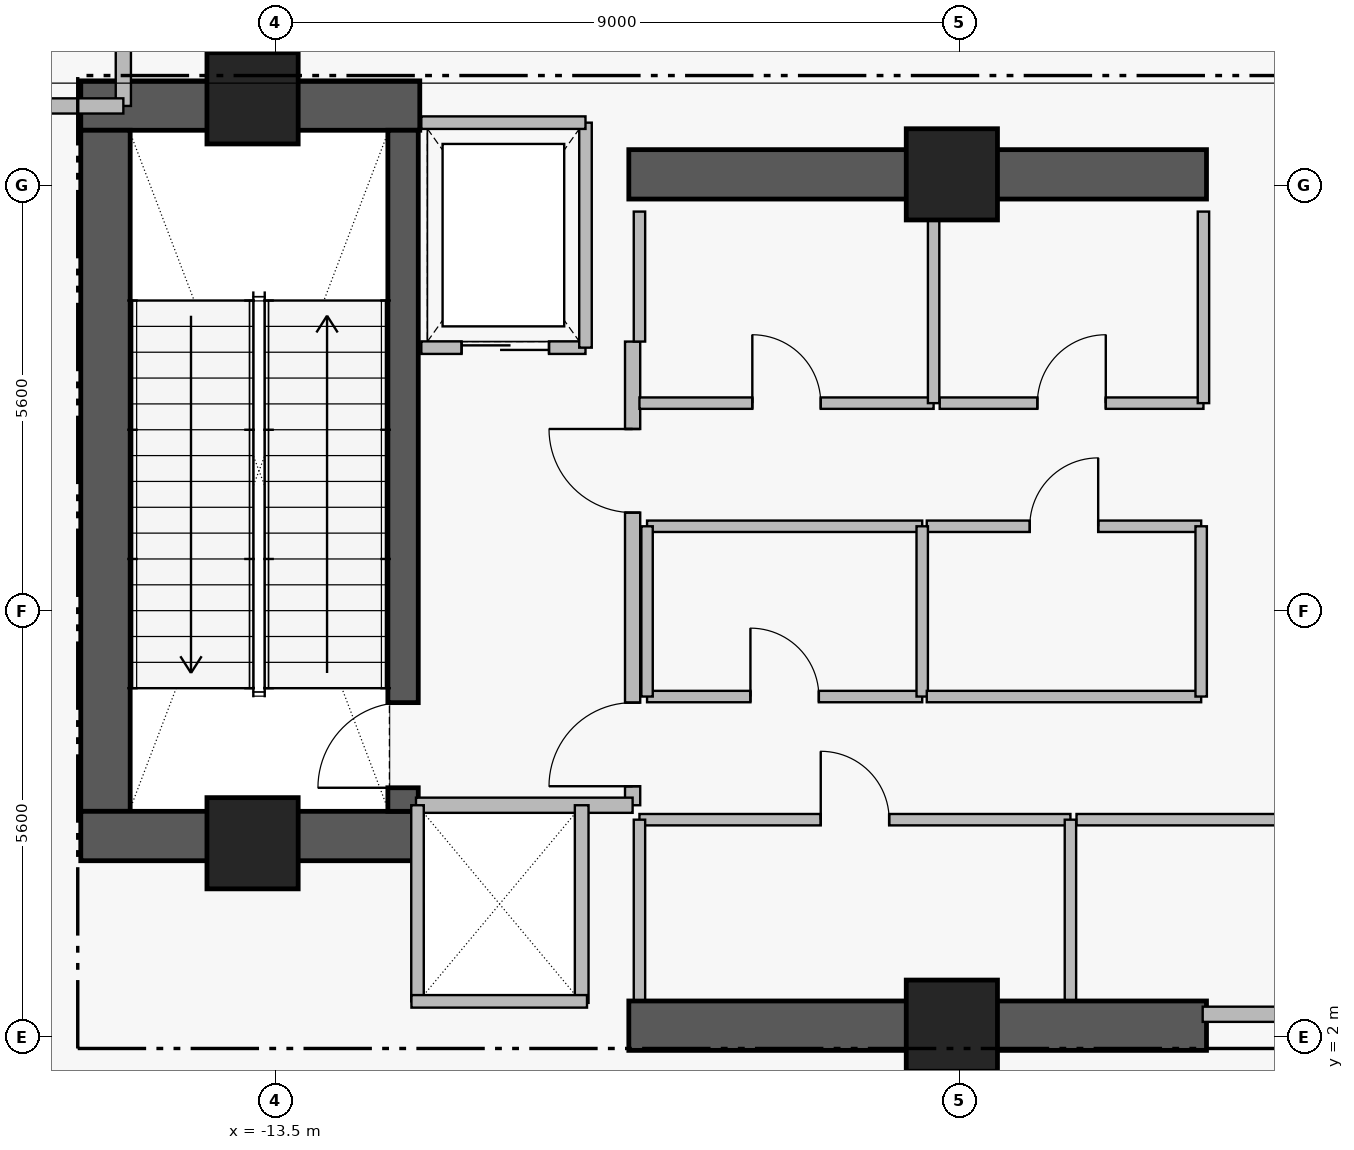
"""IFC4 building model, lengths in metres.
Left out: names, types, materials, properties, quantities, classifications, styles, units other than length and angle.
Written with IfcOpenShell. Run it as: python <this file> out.ifc"""

import sys

from ifc_helpers import new_model, si_unit, direction, frame, frame_2d, origin, origin_2d, place, context, subcontext, project, spatial, rectangle, extrude, element, fill, save


model = new_model("IFC4")
c1 = context("Model", 3, precision=1e-05, world=origin(), true_north=direction((0.0, 1.0)))
c2 = subcontext(c1, "Body", "Model", "MODEL_VIEW")
j1 = project(units=[si_unit("LENGTHUNIT", "METRE"), si_unit("PLANEANGLEUNIT", "RADIAN")], contexts=[c1])
p1 = place(None, origin())
s1 = spatial("IfcSite", under=j1, at=p1, CompositionType="ELEMENT")
p2 = place(p1, origin())
s2 = spatial("IfcBuilding", under=s1, at=p2, CompositionType="ELEMENT")
p3 = place(p2, frame((0.0, 0.0, 233.65)))
s3 = spatial("IfcBuildingStorey", under=s2, at=p3, CompositionType="ELEMENT", Elevation=233.65)
p4 = place(p3, frame((-16.06, 14.255, 0.0), z_axis=(0.0, 0.0, 1.0), x_axis=(1.0, 0.0, 0.0)))
e1 = element("IfcWall", 1, at=p4, inside=s3, PredefinedType="SHEAR", context=c2, shape_type="SweptSolid", body=[
    extrude(rectangle(XDim=4.46, YDim=0.65, at=frame_2d((2.23, 0.0))), origin(), (0.0, 0.0, 1.0), 5.81),
])
p5 = place(p3, frame((-15.735, 4.97, 0.0), z_axis=(0.0, 0.0, 1.0), x_axis=(0.0, 1.0, 0.0)))
e2 = element("IfcWall", 2, at=p5, inside=s3, PredefinedType="SHEAR", context=c2, shape_type="SweptSolid", body=[
    extrude(rectangle(XDim=8.96, YDim=0.65, at=frame_2d((4.48, 0.0))), origin(), (0.0, 0.0, 1.0), 5.81),
])
p6 = place(p3, frame((-16.06, 4.645, 0.0), z_axis=(0.0, 0.0, 1.0), x_axis=(1.0, 0.0, 0.0)))
e3 = element("IfcWall", 3, at=p6, inside=s3, PredefinedType="SHEAR", context=c2, shape_type="SweptSolid", body=[
    extrude(rectangle(XDim=4.46, YDim=0.65, at=frame_2d((2.23, 0.0))), origin(), (0.0, 0.0, 1.0), 5.81),
])
for number, where, z_axis, x_axis in (
    (4, (-8.85, 2.15, 0.0), (0.0, 0.0, 1.0), (1.0, 0.0, 0.0)),
    (5, (-8.85, 13.35, 0.0), (0.0, 0.0, 1.0), (1.0, 0.0, 0.0)),
):
    element("IfcWall", number, at=place(p3, frame(where, z_axis=z_axis, x_axis=x_axis)), inside=s3, PredefinedType="SHEAR", context=c2, shape_type="SweptSolid", body=[
        extrude(rectangle(XDim=7.6, YDim=0.65, at=frame_2d((3.8, 0.0))), origin(), (0.0, 0.0, 1.0), 5.74),
    ])
p7 = place(p3, frame((-11.82, 4.97, 0.0), z_axis=(0.0, 0.0, 1.0), x_axis=(0.0, 1.0, 0.0)))
e6 = element("IfcWall", 6, at=p7, inside=s3, PredefinedType="SHEAR", context=c2, shape_type="SweptSolid", body=[
    extrude(rectangle(XDim=8.96, YDim=0.4, at=frame_2d((4.48, 0.0))), origin(), (0.0, 0.0, 1.0), 5.81),
])
p8 = place(p7, frame((0.31, 0.0, 0.0)))
e7 = element("IfcOpeningElement", 7, at=p8, cuts=e6, PredefinedType="OPENING", context=c2, shape_type="SweptSolid", body=[
    extrude(rectangle(XDim=1.12, YDim=2.22, at=frame_2d((0.56, 1.11))), frame((0.0, 0.21, 0.0), z_axis=(0.0, -1.0, 0.0), x_axis=(1.0, 0.0, 0.0)), (0.0, 0.0, 1.0), 0.42),
])
for number, where, z_axis, x_axis in (
    (8, (-13.8, 14.35, 0.0), (0.0, 0.0, 1.0), (1.0, 0.0, 0.0)),
    (9, (-4.6, 13.35, 0.0), (0.0, 0.0, 1.0), (1.0, 0.0, 0.0)),
    (10, (-13.8, 4.55, 0.0), (0.0, 0.0, 1.0), (1.0, 0.0, 0.0)),
    (11, (-4.6, 2.15, 0.0), (0.0, 0.0, 1.0), (1.0, 0.0, 0.0)),
):
    element("IfcColumn", number, at=place(p3, frame(where, z_axis=z_axis, x_axis=x_axis)), inside=s3, PredefinedType="COLUMN", context=c2, shape_type="SweptSolid", body=[
        extrude(rectangle(XDim=1.2, YDim=1.2, at=origin_2d()), origin(), (0.0, 0.0, 1.0), 6.0),
    ])
p9 = place(p3, frame((-8.8, 5.05, 0.0), z_axis=(0.0, 0.0, 1.0), x_axis=(0.0, 1.0, 0.0)))
e12 = element("IfcWall", 12, at=p9, inside=s3, PredefinedType="PARTITIONING", context=c2, shape_type="SweptSolid", body=[
    extrude(rectangle(XDim=6.1, YDim=0.2, at=frame_2d((3.05, 0.0))), origin(), (0.0, 0.0, 1.0), 5.74),
])
p10 = place(p9, frame((0.25, 0.0, 0.0)))
e13 = element("IfcOpeningElement", 13, at=p10, cuts=e12, PredefinedType="OPENING", context=c2, shape_type="SweptSolid", body=[
    extrude(rectangle(XDim=1.1, YDim=2.2, at=frame_2d((0.55, 1.1))), frame((0.0, 0.11, 0.0), z_axis=(0.0, -1.0, 0.0), x_axis=(1.0, 0.0, 0.0)), (0.0, 0.0, 1.0), 0.22),
])
p11 = place(p9, frame((3.85, 0.0, 0.0)))
e14 = element("IfcOpeningElement", 14, at=p11, cuts=e12, PredefinedType="OPENING", context=c2, shape_type="SweptSolid", body=[
    extrude(rectangle(XDim=1.1, YDim=2.2, at=frame_2d((0.55, 1.1))), frame((0.0, 0.11, 0.0), z_axis=(0.0, -1.0, 0.0), x_axis=(1.0, 0.0, 0.0)), (0.0, 0.0, 1.0), 0.22),
])
p12 = place(p3, frame((-11.58, 11.07, 0.0), z_axis=(0.0, 0.0, 1.0), x_axis=(1.0, 0.0, 0.0)))
e15 = element("IfcWall", 15, at=p12, inside=s3, PredefinedType="PARTITIONING", context=c2, shape_type="SweptSolid", body=[
    extrude(rectangle(XDim=2.16, YDim=0.165, at=frame_2d((1.08, 0.0))), origin(), (0.0, 0.0, 1.0), 5.74),
])
p13 = place(p12, frame((0.53, 0.0, 0.0)))
e16 = element("IfcOpeningElement", 16, at=p13, cuts=e15, PredefinedType="OPENING", context=c2, shape_type="SweptSolid", body=[
    extrude(rectangle(XDim=1.15, YDim=2.25, at=frame_2d((0.575, 1.125))), frame((0.0, 0.093, 0.0), z_axis=(0.0, -1.0, 0.0), x_axis=(1.0, 0.0, 0.0)), (0.0, 0.0, 1.0), 0.185),
])
p14 = place(p3, frame((-8.71, 4.86, 0.0), z_axis=(0.0, 0.0, 1.0), x_axis=(1.0, 0.0, 0.0)))
e17 = element("IfcWall", 17, at=p14, inside=s3, PredefinedType="PARTITIONING", context=c2, shape_type="SweptSolid", body=[
    extrude(rectangle(XDim=5.67, YDim=0.15, at=frame_2d((2.835, 0.0))), origin(), (0.0, 0.0, 1.0), 5.74),
])
p15 = place(p14, frame((2.385, 0.0, 0.0)))
e18 = element("IfcOpeningElement", 18, at=p15, cuts=e17, PredefinedType="OPENING", context=c2, shape_type="SweptSolid", body=[
    extrude(rectangle(XDim=0.9, YDim=2.15, at=frame_2d((0.45, 1.075))), frame((0.0, 0.085, 0.0), z_axis=(0.0, -1.0, 0.0), x_axis=(1.0, 0.0, 0.0)), (0.0, 0.0, 1.0), 0.17),
])
p16 = place(p3, frame((-2.96, 4.86, 0.0), z_axis=(0.0, 0.0, 1.0), x_axis=(1.0, 0.0, 0.0)))
e19 = element("IfcWall", 19, at=p16, inside=s3, PredefinedType="PARTITIONING", context=c2, shape_type="SweptSolid", body=[
    extrude(rectangle(XDim=6.67, YDim=0.15, at=frame_2d((3.335, 0.0))), origin(), (0.0, 0.0, 1.0), 5.74),
])
p17 = place(p16, frame((2.885, 0.0, 0.0)))
e20 = element("IfcOpeningElement", 20, at=p17, cuts=e19, PredefinedType="OPENING", context=c2, shape_type="SweptSolid", body=[
    extrude(rectangle(XDim=0.9, YDim=2.15, at=frame_2d((0.45, 1.075))), frame((0.0, 0.085, 0.0), z_axis=(0.0, -1.0, 0.0), x_axis=(1.0, 0.0, 0.0)), (0.0, 0.0, 1.0), 0.17),
])
p18 = place(p3, frame((-8.71, 10.34, 0.0), z_axis=(0.0, 0.0, 1.0), x_axis=(1.0, 0.0, 0.0)))
e21 = element("IfcWall", 21, at=p18, inside=s3, PredefinedType="PARTITIONING", context=c2, shape_type="SweptSolid", body=[
    extrude(rectangle(XDim=3.87, YDim=0.15, at=frame_2d((1.935, 0.0))), origin(), (0.0, 0.0, 1.0), 5.74),
])
p19 = place(p18, frame((1.485, 0.0, 0.0)))
e22 = element("IfcOpeningElement", 22, at=p19, cuts=e21, PredefinedType="OPENING", context=c2, shape_type="SweptSolid", body=[
    extrude(rectangle(XDim=0.9, YDim=2.15, at=frame_2d((0.45, 1.075))), frame((0.0, 0.085, 0.0), z_axis=(0.0, -1.0, 0.0), x_axis=(1.0, 0.0, 0.0)), (0.0, 0.0, 1.0), 0.17),
])
p20 = place(p3, frame((-4.76, 10.34, 0.0), z_axis=(0.0, 0.0, 1.0), x_axis=(1.0, 0.0, 0.0)))
e23 = element("IfcWall", 23, at=p20, inside=s3, PredefinedType="PARTITIONING", context=c2, shape_type="SweptSolid", body=[
    extrude(rectangle(XDim=3.47, YDim=0.15, at=frame_2d((1.735, 0.0))), origin(), (0.0, 0.0, 1.0), 5.74),
])
p21 = place(p20, frame((1.285, 0.0, 0.0)))
e24 = element("IfcOpeningElement", 24, at=p21, cuts=e23, PredefinedType="OPENING", context=c2, shape_type="SweptSolid", body=[
    extrude(rectangle(XDim=0.9, YDim=2.15, at=frame_2d((0.45, 1.075))), frame((0.0, 0.085, 0.0), z_axis=(0.0, -1.0, 0.0), x_axis=(1.0, 0.0, 0.0)), (0.0, 0.0, 1.0), 0.17),
])
p22 = place(p3, frame((-8.61, 6.48, 0.0), z_axis=(0.0, 0.0, 1.0), x_axis=(1.0, 0.0, 0.0)))
e25 = element("IfcWall", 25, at=p22, inside=s3, PredefinedType="PARTITIONING", context=c2, shape_type="SweptSolid", body=[
    extrude(rectangle(XDim=3.62, YDim=0.15, at=frame_2d((1.81, 0.0))), origin(), (0.0, 0.0, 1.0), 5.74),
])
p23 = place(p22, frame((1.36, 0.0, 0.0)))
e26 = element("IfcOpeningElement", 26, at=p23, cuts=e25, PredefinedType="OPENING", context=c2, shape_type="SweptSolid", body=[
    extrude(rectangle(XDim=0.9, YDim=2.15, at=frame_2d((0.45, 1.075))), frame((0.0, 0.085, 0.0), z_axis=(0.0, -1.0, 0.0), x_axis=(1.0, 0.0, 0.0)), (0.0, 0.0, 1.0), 0.17),
])
p24 = place(p3, frame((-4.93, 8.72, 0.0), z_axis=(0.0, 0.0, 1.0), x_axis=(1.0, 0.0, 0.0)))
e27 = element("IfcWall", 27, at=p24, inside=s3, PredefinedType="PARTITIONING", context=c2, shape_type="SweptSolid", body=[
    extrude(rectangle(XDim=3.61, YDim=0.15, at=frame_2d((1.805, 0.0))), origin(), (0.0, 0.0, 1.0), 5.74),
])
p25 = place(p24, frame((1.355, 0.0, 0.0)))
e28 = element("IfcOpeningElement", 28, at=p25, cuts=e27, PredefinedType="OPENING", context=c2, shape_type="SweptSolid", body=[
    extrude(rectangle(XDim=0.9, YDim=2.15, at=frame_2d((0.45, 1.075))), frame((0.0, 0.085, 0.0), z_axis=(0.0, -1.0, 0.0), x_axis=(1.0, 0.0, 0.0)), (0.0, 0.0, 1.0), 0.17),
])
p26 = place(p3, frame((-15.5, 14.25, 0.0), z_axis=(0.0, 0.0, 1.0), x_axis=(0.0, 1.0, 0.0)))
e29 = element("IfcWall", 29, at=p26, inside=s3, PredefinedType="PARTITIONING", context=c2, shape_type="SweptSolid", body=[
    extrude(rectangle(XDim=5.05, YDim=0.2, at=frame_2d((2.525, 0.0))), origin(), (0.0, 0.0, 1.0), 5.74),
])
p27 = place(p26, frame((1.25, 0.0, 0.0)))
e30 = element("IfcOpeningElement", 30, at=p27, cuts=e29, PredefinedType="OPENING", context=c2, shape_type="SweptSolid", body=[
    extrude(rectangle(XDim=1.1, YDim=2.2, at=frame_2d((0.55, 1.1))), frame((0.0, 0.11, 0.0), z_axis=(0.0, -1.0, 0.0), x_axis=(1.0, 0.0, 0.0)), (0.0, 0.0, 1.0), 0.22),
])
p28 = place(p3, frame((-11.65, 5.05, 0.0), z_axis=(0.0, 0.0, 1.0), x_axis=(1.0, 0.0, 0.0)))
e31 = element("IfcWall", 31, at=p28, inside=s3, PredefinedType="PARTITIONING", context=c2, shape_type="SweptSolid", body=[
    extrude(rectangle(XDim=2.85, YDim=0.2, at=frame_2d((1.425, 0.0))), origin(), (0.0, 0.0, 1.0), 5.74),
])
p29 = place(p3, frame((-9.42, 11.07, 0.0), z_axis=(0.0, 0.0, 1.0), x_axis=(0.0, 1.0, 0.0)))
e32 = element("IfcWall", 32, at=p29, inside=s3, PredefinedType="PARTITIONING", context=c2, shape_type="SweptSolid", body=[
    extrude(rectangle(XDim=2.96, YDim=0.165, at=frame_2d((1.48, 0.0))), origin(), (0.0, 0.0, 1.0), 5.74),
])
p30 = place(p3, frame((-11.58, 14.03, 0.0), z_axis=(0.0, 0.0, 1.0), x_axis=(1.0, 0.0, 0.0)))
e33 = element("IfcWall", 33, at=p30, inside=s3, PredefinedType="PARTITIONING", context=c2, shape_type="SweptSolid", body=[
    extrude(rectangle(XDim=2.16, YDim=0.165, at=frame_2d((1.08, 0.0))), origin(), (0.0, 0.0, 1.0), 5.74),
])
p31 = place(p3, frame((-1.3, 2.3, 0.0), z_axis=(0.0, 0.0, 1.0), x_axis=(1.0, 0.0, 0.0)))
e34 = element("IfcWall", 34, at=p31, inside=s3, PredefinedType="PARTITIONING", context=c2, shape_type="SweptSolid", body=[
    extrude(rectangle(XDim=2.6, YDim=0.2, at=frame_2d((1.3, 0.0))), origin(), (0.0, 0.0, 1.0), 4.64),
])
for number, where, z_axis, x_axis in (
    (35, (-8.71, 2.49, 0.0), (0.0, 0.0, 1.0), (0.0, 1.0, 0.0)),
    (36, (-3.04, 2.49, 0.0), (0.0, 0.0, 1.0), (0.0, 1.0, 0.0)),
):
    element("IfcWall", number, at=place(p3, frame(where, z_axis=z_axis, x_axis=x_axis)), inside=s3, PredefinedType="PARTITIONING", context=c2, shape_type="SweptSolid", body=[
        extrude(rectangle(XDim=2.37, YDim=0.15, at=frame_2d((1.185, 0.0))), origin(), (0.0, 0.0, 1.0), 5.74),
    ])
p32 = place(p3, frame((-8.71, 11.15, 0.0), z_axis=(0.0, 0.0, 1.0), x_axis=(0.0, 1.0, 0.0)))
e37 = element("IfcWall", 37, at=p32, inside=s3, PredefinedType="PARTITIONING", context=c2, shape_type="SweptSolid", body=[
    extrude(rectangle(XDim=1.71, YDim=0.15, at=frame_2d((0.855, 0.0))), origin(), (0.0, 0.0, 1.0), 5.74),
])
for number, where, z_axis, x_axis in (
    (38, (-4.84, 10.34, 0.0), (0.0, 0.0, 1.0), (0.0, 1.0, 0.0)),
    (39, (-1.29, 10.34, 0.0), (0.0, 0.0, 1.0), (0.0, 1.0, 0.0)),
):
    element("IfcWall", number, at=place(p3, frame(where, z_axis=z_axis, x_axis=x_axis)), inside=s3, PredefinedType="PARTITIONING", context=c2, shape_type="SweptSolid", body=[
        extrude(rectangle(XDim=2.52, YDim=0.15, at=frame_2d((1.26, 0.0))), origin(), (0.0, 0.0, 1.0), 5.74),
    ])
p33 = place(p3, frame((-9.47, 2.45, 0.0), z_axis=(0.0, 0.0, 1.0), x_axis=(0.0, 1.0, 0.0)))
e40 = element("IfcWall", 40, at=p33, inside=s3, PredefinedType="PARTITIONING", context=c2, shape_type="SweptSolid", body=[
    extrude(rectangle(XDim=2.6, YDim=0.18, at=frame_2d((1.3, 0.0))), origin(), (0.0, 0.0, 1.0), 5.74),
])
p34 = place(p3, frame((-11.63, 2.47, 0.0), z_axis=(0.0, 0.0, 1.0), x_axis=(0.0, 1.0, 0.0)))
e41 = element("IfcWall", 41, at=p34, inside=s3, PredefinedType="PARTITIONING", context=c2, shape_type="SweptSolid", body=[
    extrude(rectangle(XDim=2.58, YDim=0.165, at=frame_2d((1.29, 0.0))), origin(), (0.0, 0.0, 1.0), 5.74),
])
p35 = place(p3, frame((-11.71, 2.47, 0.0), z_axis=(0.0, 0.0, 1.0), x_axis=(1.0, 0.0, 0.0)))
e42 = element("IfcWall", 42, at=p35, inside=s3, PredefinedType="PARTITIONING", context=c2, shape_type="SweptSolid", body=[
    extrude(rectangle(XDim=2.31, YDim=0.165, at=frame_2d((1.155, 0.0))), origin(), (0.0, 0.0, 1.0), 4.64),
])
p36 = place(p3, frame((-8.61, 8.72, 0.0), z_axis=(0.0, 0.0, 1.0), x_axis=(1.0, 0.0, 0.0)))
e43 = element("IfcWall", 43, at=p36, inside=s3, PredefinedType="PARTITIONING", context=c2, shape_type="SweptSolid", body=[
    extrude(rectangle(XDim=3.62, YDim=0.15, at=frame_2d((1.81, 0.0))), origin(), (0.0, 0.0, 1.0), 5.74),
])
for number, where, z_axis, x_axis in (
    (44, (-8.61, 6.48, 0.0), (0.0, 0.0, 1.0), (0.0, 1.0, 0.0)),
    (45, (-4.99, 6.48, 0.0), (0.0, 0.0, 1.0), (0.0, 1.0, 0.0)),
):
    element("IfcWall", number, at=place(p3, frame(where, z_axis=z_axis, x_axis=x_axis)), inside=s3, PredefinedType="PARTITIONING", context=c2, shape_type="SweptSolid", body=[
        extrude(rectangle(XDim=2.24, YDim=0.15, at=frame_2d((1.12, 0.0))), origin(), (0.0, 0.0, 1.0), 5.74),
    ])
p37 = place(p3, frame((-4.93, 6.48, 0.0), z_axis=(0.0, 0.0, 1.0), x_axis=(1.0, 0.0, 0.0)))
e46 = element("IfcWall", 46, at=p37, inside=s3, PredefinedType="PARTITIONING", context=c2, shape_type="SweptSolid", body=[
    extrude(rectangle(XDim=3.61, YDim=0.15, at=frame_2d((1.805, 0.0))), origin(), (0.0, 0.0, 1.0), 5.74),
])
p38 = place(p3, frame((-1.32, 6.48, 0.0), z_axis=(0.0, 0.0, 1.0), x_axis=(0.0, 1.0, 0.0)))
e47 = element("IfcWall", 47, at=p38, inside=s3, PredefinedType="PARTITIONING", context=c2, shape_type="SweptSolid", body=[
    extrude(rectangle(XDim=2.24, YDim=0.15, at=frame_2d((1.12, 0.0))), origin(), (0.0, 0.0, 1.0), 5.74),
])
p39 = place(p3, frame((-20.5, 14.25, 0.0), z_axis=(0.0, 0.0, 1.0), x_axis=(1.0, 0.0, 0.0)))
e48 = element("IfcWall", 48, at=p39, inside=s3, PredefinedType="PARTITIONING", context=c2, shape_type="SweptSolid", body=[
    extrude(rectangle(XDim=5.0, YDim=0.2, at=frame_2d((2.5, 0.0))), origin(), (0.0, 0.0, 1.0), 5.74),
])
p40 = place(p8, origin())
e49 = element("IfcDoor", 49, at=p40, inside=s3, OperationType="SINGLE_SWING_LEFT", PredefinedType="DOOR", context=c2, shape_type="SweptSolid", body=[
    extrude(rectangle(XDim=1.12, YDim=2.22, at=frame_2d((0.56, 1.11))), frame((0.0, 0.025, 0.0), z_axis=(0.0, -1.0, 0.0), x_axis=(1.0, 0.0, 0.0)), (0.0, 0.0, 1.0), 0.05),
])
fill(e7, e49)
p41 = place(p10, origin())
e50 = element("IfcDoor", 50, at=p41, inside=s3, OperationType="SINGLE_SWING_LEFT", PredefinedType="DOOR", context=c2, shape_type="SweptSolid", body=[
    extrude(rectangle(XDim=1.1, YDim=2.2, at=frame_2d((0.55, 1.1))), frame((0.0, 0.025, 0.0), z_axis=(0.0, -1.0, 0.0), x_axis=(1.0, 0.0, 0.0)), (0.0, 0.0, 1.0), 0.05),
])
fill(e13, e50)
p42 = place(p11, origin())
e51 = element("IfcDoor", 51, at=p42, inside=s3, OperationType="SINGLE_SWING_RIGHT", PredefinedType="DOOR", context=c2, shape_type="SweptSolid", body=[
    extrude(rectangle(XDim=1.1, YDim=2.2, at=frame_2d((0.55, 1.1))), frame((0.0, 0.025, 0.0), z_axis=(0.0, -1.0, 0.0), x_axis=(1.0, 0.0, 0.0)), (0.0, 0.0, 1.0), 0.05),
])
fill(e14, e51)
p43 = place(p13, origin())
e52 = element("IfcDoor", 52, at=p43, inside=s3, OperationType="SLIDING_TO_LEFT", PredefinedType="DOOR", context=c2, shape_type="SweptSolid", body=[
    extrude(rectangle(XDim=1.15, YDim=2.25, at=frame_2d((0.575, 1.125))), frame((0.0, 0.025, 0.0), z_axis=(0.0, -1.0, 0.0), x_axis=(1.0, 0.0, 0.0)), (0.0, 0.0, 1.0), 0.05),
])
fill(e16, e52)
p44 = place(p15, origin())
e53 = element("IfcDoor", 53, at=p44, inside=s3, OperationType="SINGLE_SWING_LEFT", PredefinedType="DOOR", context=c2, shape_type="SweptSolid", body=[
    extrude(rectangle(XDim=0.9, YDim=2.15, at=frame_2d((0.45, 1.075))), frame((0.0, 0.025, 0.0), z_axis=(0.0, -1.0, 0.0), x_axis=(1.0, 0.0, 0.0)), (0.0, 0.0, 1.0), 0.05),
])
fill(e18, e53)
p45 = place(p19, origin())
e54 = element("IfcDoor", 54, at=p45, inside=s3, OperationType="SINGLE_SWING_LEFT", PredefinedType="DOOR", context=c2, shape_type="SweptSolid", body=[
    extrude(rectangle(XDim=0.9, YDim=2.15, at=frame_2d((0.45, 1.075))), frame((0.0, 0.025, 0.0), z_axis=(0.0, -1.0, 0.0), x_axis=(1.0, 0.0, 0.0)), (0.0, 0.0, 1.0), 0.05),
])
fill(e22, e54)
p46 = place(p21, origin())
e55 = element("IfcDoor", 55, at=p46, inside=s3, OperationType="SINGLE_SWING_RIGHT", PredefinedType="DOOR", context=c2, shape_type="SweptSolid", body=[
    extrude(rectangle(XDim=0.9, YDim=2.15, at=frame_2d((0.45, 1.075))), frame((0.0, 0.025, 0.0), z_axis=(0.0, -1.0, 0.0), x_axis=(1.0, 0.0, 0.0)), (0.0, 0.0, 1.0), 0.05),
])
fill(e24, e55)
p47 = place(p23, origin())
e56 = element("IfcDoor", 56, at=p47, inside=s3, OperationType="SINGLE_SWING_LEFT", PredefinedType="DOOR", context=c2, shape_type="SweptSolid", body=[
    extrude(rectangle(XDim=0.9, YDim=2.15, at=frame_2d((0.45, 1.075))), frame((0.0, 0.025, 0.0), z_axis=(0.0, -1.0, 0.0), x_axis=(1.0, 0.0, 0.0)), (0.0, 0.0, 1.0), 0.05),
])
fill(e26, e56)
p48 = place(p25, origin())
e57 = element("IfcDoor", 57, at=p48, inside=s3, OperationType="SINGLE_SWING_RIGHT", PredefinedType="DOOR", context=c2, shape_type="SweptSolid", body=[
    extrude(rectangle(XDim=0.9, YDim=2.15, at=frame_2d((0.45, 1.075))), frame((0.0, 0.025, 0.0), z_axis=(0.0, -1.0, 0.0), x_axis=(1.0, 0.0, 0.0)), (0.0, 0.0, 1.0), 0.05),
])
fill(e28, e57)
save(model, sys.argv[1])
